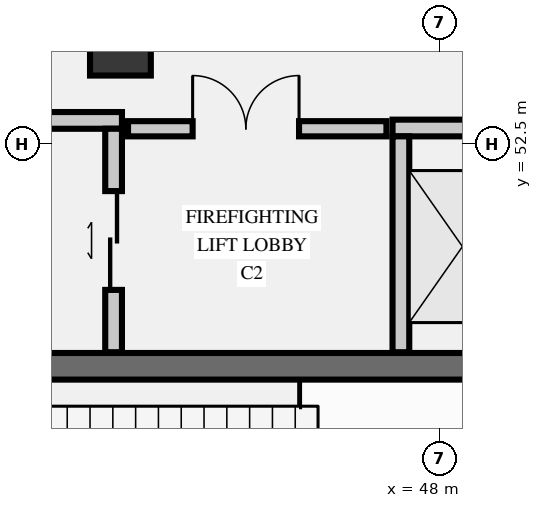
"""IFC4 building model, lengths in metres.
Left out: names, types, materials, properties, quantities, classifications, styles, units other than length and angle.
Written with IfcOpenShell. Run it as: python <this file> out.ifc"""

import sys

from ifc_helpers import new_model, si_unit, direction, frame, frame_2d, origin, origin_2d, place, context, subcontext, project, spatial, rectangle, extrude, element, fill, save


model = new_model("IFC4")
c1 = context("Model", 3, precision=1e-05, world=origin(), true_north=direction((0.0, 1.0)))
c2 = subcontext(c1, "Body", "Model", "MODEL_VIEW")
j1 = project(units=[si_unit("LENGTHUNIT", "METRE"), si_unit("PLANEANGLEUNIT", "RADIAN")], contexts=[c1])
p1 = place(None, origin())
s1 = spatial("IfcSite", under=j1, at=p1, CompositionType="ELEMENT")
p2 = place(p1, origin())
s2 = spatial("IfcBuilding", under=s1, at=p2, CompositionType="ELEMENT")
p3 = place(p2, frame((0.0, 0.0, -8.4)))
s3 = spatial("IfcBuildingStorey", under=s2, at=p3, CompositionType="ELEMENT", Elevation=-8.4)
p4 = place(p3, frame((40.65, 49.575, 0.0), z_axis=(0.0, 0.0, 1.0), x_axis=(1.0, 0.0, 0.0)))
e1 = element("IfcWall", 1, at=p4, inside=s3, PredefinedType="SHEAR", context=c2, shape_type="SweptSolid", body=[
    extrude(rectangle(XDim=8.3, YDim=0.35, at=frame_2d((4.15, 0.0))), origin(), (0.0, 0.0, 1.0), 3.92),
])
p5 = place(p3, frame((43.8, 53.8, -0.44), z_axis=(0.0, 0.0, 1.0), x_axis=(1.0, 0.0, 0.0)))
e2 = element("IfcColumn", 2, at=p5, inside=s3, PredefinedType="COLUMN", context=c2, shape_type="SweptSolid", body=[
    extrude(rectangle(XDim=0.8, YDim=0.8, at=origin_2d()), origin(), (0.0, 0.0, 1.0), 4.64),
])
p6 = place(p3, frame((41.02, 52.81, 0.0), z_axis=(0.0, 0.0, 1.0), x_axis=(1.0, 0.0, 0.0)))
e3 = element("IfcWall", 3, at=p6, inside=s3, PredefinedType="PARTITIONING", context=c2, shape_type="SweptSolid", body=[
    extrude(rectangle(XDim=2.8, YDim=0.22, at=frame_2d((1.4, 0.0))), origin(), (0.0, 0.0, 1.0), 3.9),
])
p7 = place(p3, frame((43.71, 49.76, 0.0), z_axis=(0.0, 0.0, 1.0), x_axis=(0.0, 1.0, 0.0)))
e4 = element("IfcWall", 4, at=p7, inside=s3, PredefinedType="PARTITIONING", context=c2, shape_type="SweptSolid", body=[
    extrude(rectangle(XDim=2.94, YDim=0.22, at=frame_2d((1.47, 0.0))), origin(), (0.0, 0.0, 1.0), 3.9),
])
p8 = place(p7, frame((0.82, 0.0, 0.0)))
e5 = element("IfcOpeningElement", 5, at=p8, cuts=e4, PredefinedType="OPENING", context=c2, shape_type="SweptSolid", body=[
    extrude(rectangle(XDim=1.3, YDim=2.2, at=frame_2d((0.65, 1.1))), frame((0.0, 0.12, 0.0), z_axis=(0.0, -1.0, 0.0), x_axis=(1.0, 0.0, 0.0)), (0.0, 0.0, 1.0), 0.24),
])
p9 = place(p3, frame((47.38, 52.71, 0.0), z_axis=(0.0, 0.0, 1.0), x_axis=(1.0, 0.0, 0.0)))
e6 = element("IfcWall", 6, at=p9, inside=s3, PredefinedType="PARTITIONING", context=c2, shape_type="SweptSolid", body=[
    extrude(rectangle(XDim=3.04, YDim=0.22, at=frame_2d((1.52, 0.0))), origin(), (0.0, 0.0, 1.0), 3.9),
])
p10 = place(p9, frame((0.97, 0.0, 0.0)))
e7 = element("IfcOpeningElement", 7, at=p10, cuts=e6, PredefinedType="OPENING", context=c2, shape_type="SweptSolid", body=[
    extrude(rectangle(XDim=1.1, YDim=2.15, at=frame_2d((0.55, 1.075))), frame((0.0, 0.12, 0.0), z_axis=(0.0, -1.0, 0.0), x_axis=(1.0, 0.0, 0.0)), (0.0, 0.0, 1.0), 0.24),
])
p11 = place(p3, frame((47.49, 49.76, 0.0), z_axis=(0.0, 0.0, 1.0), x_axis=(0.0, 1.0, 0.0)))
e8 = element("IfcWall", 8, at=p11, inside=s3, PredefinedType="PARTITIONING", context=c2, shape_type="SweptSolid", body=[
    extrude(rectangle(XDim=2.84, YDim=0.22, at=frame_2d((1.42, 0.0))), origin(), (0.0, 0.0, 1.0), 3.9),
])
p12 = place(p3, frame((43.9, 52.7, 0.0), z_axis=(0.0, 0.0, 1.0), x_axis=(1.0, 0.0, 0.0)))
e9 = element("IfcWall", 9, at=p12, inside=s3, PredefinedType="PARTITIONING", context=c2, shape_type="SweptSolid", body=[
    extrude(rectangle(XDim=3.4, YDim=0.2, at=frame_2d((1.7, 0.0))), origin(), (0.0, 0.0, 1.0), 3.9),
])
p13 = place(p12, frame((0.85, 0.0, 0.0)))
e10 = element("IfcOpeningElement", 10, at=p13, cuts=e9, PredefinedType="OPENING", context=c2, shape_type="SweptSolid", body=[
    extrude(rectangle(XDim=1.4, YDim=2.25, at=frame_2d((0.7, 1.125))), frame((0.0, 0.11, 0.0), z_axis=(0.0, -1.0, 0.0), x_axis=(1.0, 0.0, 0.0)), (0.0, 0.0, 1.0), 0.22),
])
p14 = place(p8, origin())
e11 = element("IfcDoor", 11, at=p14, inside=s3, OperationType="DOUBLE_DOOR_SLIDING", PredefinedType="DOOR", context=c2, shape_type="SweptSolid", body=[
    extrude(rectangle(XDim=1.3, YDim=2.2, at=frame_2d((0.65, 1.1))), frame((0.0, 0.025, 0.0), z_axis=(0.0, -1.0, 0.0), x_axis=(1.0, 0.0, 0.0)), (0.0, 0.0, 1.0), 0.05),
])
fill(e5, e11)
p15 = place(p13, origin())
e12 = element("IfcDoor", 12, at=p15, inside=s3, OperationType="DOUBLE_DOOR_SINGLE_SWING", PredefinedType="DOOR", context=c2, shape_type="SweptSolid", body=[
    extrude(rectangle(XDim=1.4, YDim=2.25, at=frame_2d((0.7, 1.125))), frame((0.0, 0.025, 0.0), z_axis=(0.0, -1.0, 0.0), x_axis=(1.0, 0.0, 0.0)), (0.0, 0.0, 1.0), 0.05),
])
fill(e10, e12)
save(model, sys.argv[1])
